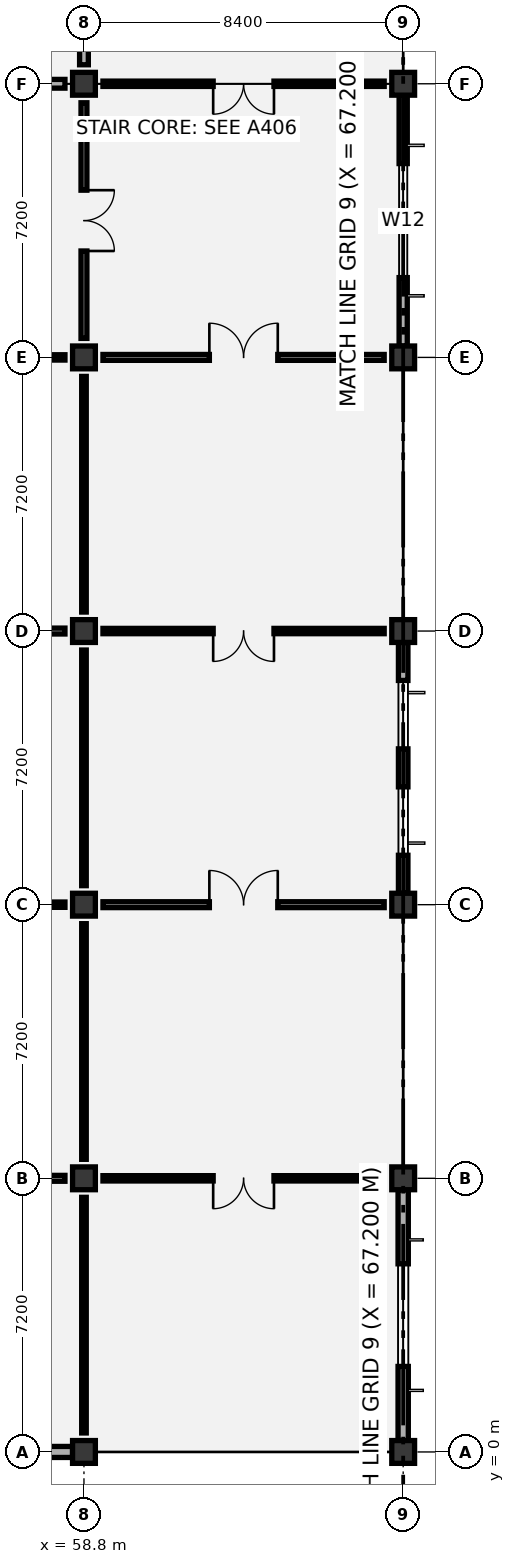
"""IFC4 building model, lengths in metres.
Left out: names, types, materials, properties, quantities, classifications, styles, units other than length and angle.
Written with IfcOpenShell. Run it as: python <this file> out.ifc"""

import sys

from ifc_helpers import new_model, si_unit, direction, frame, frame_2d, origin, origin_2d, place, context, subcontext, project, spatial, rectangle, extrude, element, fill, save


model = new_model("IFC4")
c1 = context("Model", 3, precision=1e-05, world=origin(), true_north=direction((0.0, 1.0)))
c2 = subcontext(c1, "Body", "Model", "MODEL_VIEW")
j1 = project(units=[si_unit("LENGTHUNIT", "METRE"), si_unit("PLANEANGLEUNIT", "RADIAN")], contexts=[c1])
p1 = place(None, origin())
s1 = spatial("IfcSite", under=j1, at=p1, CompositionType="ELEMENT")
p2 = place(p1, origin())
s2 = spatial("IfcBuilding", under=s1, at=p2, CompositionType="ELEMENT")
p3 = place(p2, frame((0.0, 0.0, 11.4)))
s3 = spatial("IfcBuildingStorey", under=s2, at=p3, CompositionType="ELEMENT", Elevation=11.4)
for number, where, z_axis, x_axis in (
    (1, (58.8, 0.0, 0.0), (0.0, 0.0, 1.0), (1.0, 0.0, 0.0)),
    (2, (58.8, 7.2, 0.0), (0.0, 0.0, 1.0), (1.0, 0.0, 0.0)),
    (3, (58.8, 14.4, 0.0), (0.0, 0.0, 1.0), (1.0, 0.0, 0.0)),
    (4, (58.8, 21.6, 0.0), (0.0, 0.0, 1.0), (1.0, 0.0, 0.0)),
    (5, (58.8, 28.8, 0.0), (0.0, 0.0, 1.0), (1.0, 0.0, 0.0)),
    (6, (58.8, 36.0, 0.0), (0.0, 0.0, 1.0), (1.0, 0.0, 0.0)),
    (7, (67.2, 0.0, 0.0), (0.0, 0.0, 1.0), (1.0, 0.0, 0.0)),
    (8, (67.2, 7.2, 0.0), (0.0, 0.0, 1.0), (1.0, 0.0, 0.0)),
    (9, (67.2, 14.4, 0.0), (0.0, 0.0, 1.0), (1.0, 0.0, 0.0)),
    (10, (67.2, 21.6, 0.0), (0.0, 0.0, 1.0), (1.0, 0.0, 0.0)),
    (11, (67.2, 28.8, 0.0), (0.0, 0.0, 1.0), (1.0, 0.0, 0.0)),
    (12, (67.2, 36.0, 0.0), (0.0, 0.0, 1.0), (1.0, 0.0, 0.0)),
):
    element("IfcColumn", number, at=place(p3, frame(where, z_axis=z_axis, x_axis=x_axis)), inside=s3, PredefinedType="COLUMN", context=c2, shape_type="SweptSolid", body=[
        extrude(rectangle(XDim=0.6, YDim=0.6, at=origin_2d()), origin(), (0.0, 0.0, 1.0), 5.4),
    ])
p4 = place(p3, frame((50.7, 0.0, 0.0), z_axis=(0.0, 0.0, 1.0), x_axis=(1.0, 0.0, 0.0)))
e13 = element("IfcWall", 13, at=p4, inside=s3, PredefinedType="SOLIDWALL", context=c2, shape_type="SweptSolid", body=[
    extrude(rectangle(XDim=7.8, YDim=0.29, at=frame_2d((3.9, 0.0))), origin(), (0.0, 0.0, 1.0), 4.52),
])
p5 = place(p4, frame((2.475, 0.0, 0.9)))
e14 = element("IfcOpeningElement", 14, at=p5, cuts=e13, PredefinedType="OPENING", context=c2, shape_type="SweptSolid", body=[
    extrude(rectangle(XDim=2.85, YDim=1.95, at=frame_2d((1.425, 0.975))), frame((0.0, 0.155, 0.0), z_axis=(0.0, -1.0, 0.0), x_axis=(1.0, 0.0, 0.0)), (0.0, 0.0, 1.0), 0.31),
])
p6 = place(p3, frame((67.2, 0.3, 0.0), z_axis=(0.0, 0.0, 1.0), x_axis=(0.0, 1.0, 0.0)))
e15 = element("IfcWall", 15, at=p6, inside=s3, PredefinedType="SOLIDWALL", context=c2, shape_type="SweptSolid", body=[
    extrude(rectangle(XDim=6.6, YDim=0.27, at=frame_2d((3.3, 0.0))), origin(), (0.0, 0.0, 1.0), 4.52),
])
p7 = place(p6, frame((1.95, 0.0, 0.9)))
e16 = element("IfcOpeningElement", 16, at=p7, cuts=e15, PredefinedType="OPENING", context=c2, shape_type="SweptSolid", body=[
    extrude(rectangle(XDim=2.7, YDim=2.1, at=frame_2d((1.35, 1.05))), frame((0.0, 0.145, 0.0), z_axis=(0.0, -1.0, 0.0), x_axis=(1.0, 0.0, 0.0)), (0.0, 0.0, 1.0), 0.29),
])
p8 = place(p3, frame((67.2, 14.7, 0.0), z_axis=(0.0, 0.0, 1.0), x_axis=(0.0, 1.0, 0.0)))
e17 = element("IfcWall", 17, at=p8, inside=s3, PredefinedType="SOLIDWALL", context=c2, shape_type="SweptSolid", body=[
    extrude(rectangle(XDim=6.6, YDim=0.25, at=frame_2d((3.3, 0.0))), origin(), (0.0, 0.0, 1.0), 4.445),
])
p9 = place(p8, frame((1.0, 0.0, 0.9)))
e18 = element("IfcOpeningElement", 18, at=p9, cuts=e17, PredefinedType="OPENING", context=c2, shape_type="SweptSolid", body=[
    extrude(rectangle(XDim=1.8, YDim=2.1, at=frame_2d((0.9, 1.05))), frame((0.0, 0.135, 0.0), z_axis=(0.0, -1.0, 0.0), x_axis=(1.0, 0.0, 0.0)), (0.0, 0.0, 1.0), 0.27),
])
p10 = place(p8, frame((3.8, 0.0, 0.9)))
e19 = element("IfcOpeningElement", 19, at=p10, cuts=e17, PredefinedType="OPENING", context=c2, shape_type="SweptSolid", body=[
    extrude(rectangle(XDim=1.8, YDim=2.1, at=frame_2d((0.9, 1.05))), frame((0.0, 0.135, 0.0), z_axis=(0.0, -1.0, 0.0), x_axis=(1.0, 0.0, 0.0)), (0.0, 0.0, 1.0), 0.27),
])
p11 = place(p3, frame((67.2, 29.1, 0.0), z_axis=(0.0, 0.0, 1.0), x_axis=(0.0, 1.0, 0.0)))
e20 = element("IfcWall", 20, at=p11, inside=s3, PredefinedType="SOLIDWALL", context=c2, shape_type="SweptSolid", body=[
    extrude(rectangle(XDim=6.6, YDim=0.215, at=frame_2d((3.3, 0.0))), origin(), (0.0, 0.0, 1.0), 4.445),
])
p12 = place(p11, frame((1.8, 0.0, 0.9)))
e21 = element("IfcOpeningElement", 21, at=p12, cuts=e20, PredefinedType="OPENING", context=c2, shape_type="SweptSolid", body=[
    extrude(rectangle(XDim=3.0, YDim=2.4, at=frame_2d((1.5, 1.2))), frame((0.0, 0.117, 0.0), z_axis=(0.0, -1.0, 0.0), x_axis=(1.0, 0.0, 0.0)), (0.0, 0.0, 1.0), 0.235),
])
p13 = place(p3, frame((58.8, 0.5, 0.0), z_axis=(0.0, 0.0, 1.0), x_axis=(0.0, 1.0, 0.0)))
e22 = element("IfcWall", 22, at=p13, inside=s3, PredefinedType="PARTITIONING", context=c2, shape_type="SweptSolid", body=[
    extrude(rectangle(XDim=6.2, YDim=0.12, at=frame_2d((3.1, 0.0))), origin(), (0.0, 0.0, 1.0), 4.47),
])
p14 = place(p3, frame((50.9, 7.2, 0.0), z_axis=(0.0, 0.0, 1.0), x_axis=(1.0, 0.0, 0.0)))
e23 = element("IfcWall", 23, at=p14, inside=s3, PredefinedType="PARTITIONING", context=c2, shape_type="SweptSolid", body=[
    extrude(rectangle(XDim=7.4, YDim=0.155, at=frame_2d((3.7, 0.0))), origin(), (0.0, 0.0, 1.0), 4.345),
])
p15 = place(p14, frame((2.9, 0.0, 0.0)))
e24 = element("IfcOpeningElement", 24, at=p15, cuts=e23, PredefinedType="OPENING", context=c2, shape_type="SweptSolid", body=[
    extrude(rectangle(XDim=1.6, YDim=2.2, at=frame_2d((0.8, 1.1))), frame((0.0, 0.087, 0.0), z_axis=(0.0, -1.0, 0.0), x_axis=(1.0, 0.0, 0.0)), (0.0, 0.0, 1.0), 0.175),
])
p16 = place(p3, frame((58.8, 7.7, 0.0), z_axis=(0.0, 0.0, 1.0), x_axis=(0.0, 1.0, 0.0)))
e25 = element("IfcWall", 25, at=p16, inside=s3, PredefinedType="PARTITIONING", context=c2, shape_type="SweptSolid", body=[
    extrude(rectangle(XDim=6.2, YDim=0.12, at=frame_2d((3.1, 0.0))), origin(), (0.0, 0.0, 1.0), 4.595),
])
p17 = place(p3, frame((50.9, 14.4, 0.0), z_axis=(0.0, 0.0, 1.0), x_axis=(1.0, 0.0, 0.0)))
e26 = element("IfcWall", 26, at=p17, inside=s3, PredefinedType="PARTITIONING", context=c2, shape_type="SweptSolid", body=[
    extrude(rectangle(XDim=7.4, YDim=0.14, at=frame_2d((3.7, 0.0))), origin(), (0.0, 0.0, 1.0), 4.345),
])
p18 = place(p17, frame((2.8, 0.0, 0.0)))
e27 = element("IfcOpeningElement", 27, at=p18, cuts=e26, PredefinedType="OPENING", context=c2, shape_type="SweptSolid", body=[
    extrude(rectangle(XDim=1.8, YDim=2.25, at=frame_2d((0.9, 1.125))), frame((0.0, 0.08, 0.0), z_axis=(0.0, -1.0, 0.0), x_axis=(1.0, 0.0, 0.0)), (0.0, 0.0, 1.0), 0.16),
])
p19 = place(p3, frame((58.8, 14.9, 0.0), z_axis=(0.0, 0.0, 1.0), x_axis=(0.0, 1.0, 0.0)))
e28 = element("IfcWall", 28, at=p19, inside=s3, PredefinedType="PARTITIONING", context=c2, shape_type="SweptSolid", body=[
    extrude(rectangle(XDim=6.2, YDim=0.12, at=frame_2d((3.1, 0.0))), origin(), (0.0, 0.0, 1.0), 4.395),
])
p20 = place(p3, frame((50.9, 21.6, 0.0), z_axis=(0.0, 0.0, 1.0), x_axis=(1.0, 0.0, 0.0)))
e29 = element("IfcWall", 29, at=p20, inside=s3, PredefinedType="PARTITIONING", context=c2, shape_type="SweptSolid", body=[
    extrude(rectangle(XDim=7.4, YDim=0.155, at=frame_2d((3.7, 0.0))), origin(), (0.0, 0.0, 1.0), 4.345),
])
p21 = place(p20, frame((2.9, 0.0, 0.0)))
e30 = element("IfcOpeningElement", 30, at=p21, cuts=e29, PredefinedType="OPENING", context=c2, shape_type="SweptSolid", body=[
    extrude(rectangle(XDim=1.6, YDim=2.2, at=frame_2d((0.8, 1.1))), frame((0.0, 0.087, 0.0), z_axis=(0.0, -1.0, 0.0), x_axis=(1.0, 0.0, 0.0)), (0.0, 0.0, 1.0), 0.175),
])
p22 = place(p3, frame((58.8, 22.1, 0.0), z_axis=(0.0, 0.0, 1.0), x_axis=(0.0, 1.0, 0.0)))
e31 = element("IfcWall", 31, at=p22, inside=s3, PredefinedType="PARTITIONING", context=c2, shape_type="SweptSolid", body=[
    extrude(rectangle(XDim=6.2, YDim=0.12, at=frame_2d((3.1, 0.0))), origin(), (0.0, 0.0, 1.0), 4.695),
])
p23 = place(p3, frame((50.9, 28.8, 0.0), z_axis=(0.0, 0.0, 1.0), x_axis=(1.0, 0.0, 0.0)))
e32 = element("IfcWall", 32, at=p23, inside=s3, PredefinedType="PARTITIONING", context=c2, shape_type="SweptSolid", body=[
    extrude(rectangle(XDim=7.4, YDim=0.14, at=frame_2d((3.7, 0.0))), origin(), (0.0, 0.0, 1.0), 4.345),
])
p24 = place(p23, frame((2.8, 0.0, 0.0)))
e33 = element("IfcOpeningElement", 33, at=p24, cuts=e32, PredefinedType="OPENING", context=c2, shape_type="SweptSolid", body=[
    extrude(rectangle(XDim=1.8, YDim=2.25, at=frame_2d((0.9, 1.125))), frame((0.0, 0.08, 0.0), z_axis=(0.0, -1.0, 0.0), x_axis=(1.0, 0.0, 0.0)), (0.0, 0.0, 1.0), 0.16),
])
p25 = place(p3, frame((58.8, 29.3, 0.0), z_axis=(0.0, 0.0, 1.0), x_axis=(0.0, 1.0, 0.0)))
e34 = element("IfcWall", 34, at=p25, inside=s3, PredefinedType="PARTITIONING", context=c2, shape_type="SweptSolid", body=[
    extrude(rectangle(XDim=6.2, YDim=0.155, at=frame_2d((3.1, 0.0))), origin(), (0.0, 0.0, 1.0), 4.395),
])
p26 = place(p25, frame((2.3, 0.0, 0.0)))
e35 = element("IfcOpeningElement", 35, at=p26, cuts=e34, PredefinedType="OPENING", context=c2, shape_type="SweptSolid", body=[
    extrude(rectangle(XDim=1.6, YDim=2.2, at=frame_2d((0.8, 1.1))), frame((0.0, 0.087, 0.0), z_axis=(0.0, -1.0, 0.0), x_axis=(1.0, 0.0, 0.0)), (0.0, 0.0, 1.0), 0.175),
])
p27 = place(p3, frame((50.9, 36.0, 0.0), z_axis=(0.0, 0.0, 1.0), x_axis=(1.0, 0.0, 0.0)))
e36 = element("IfcWall", 36, at=p27, inside=s3, PredefinedType="PARTITIONING", context=c2, shape_type="SweptSolid", body=[
    extrude(rectangle(XDim=7.4, YDim=0.23, at=frame_2d((3.7, 0.0))), origin(), (0.0, 0.0, 1.0), 4.345),
])
p28 = place(p27, frame((2.95, 0.0, 0.0)))
e37 = element("IfcOpeningElement", 37, at=p28, cuts=e36, PredefinedType="OPENING", context=c2, shape_type="SweptSolid", body=[
    extrude(rectangle(XDim=1.5, YDim=2.15, at=frame_2d((0.75, 1.075))), frame((0.0, 0.125, 0.0), z_axis=(0.0, -1.0, 0.0), x_axis=(1.0, 0.0, 0.0)), (0.0, 0.0, 1.0), 0.25),
])
p29 = place(p3, frame((58.8, 36.5, 0.0), z_axis=(0.0, 0.0, 1.0), x_axis=(0.0, 1.0, 0.0)))
e38 = element("IfcWall", 38, at=p29, inside=s3, PredefinedType="PARTITIONING", context=c2, shape_type="SweptSolid", body=[
    extrude(rectangle(XDim=6.2, YDim=0.23, at=frame_2d((3.1, 0.0))), origin(), (0.0, 0.0, 1.0), 4.805),
])
p30 = place(p3, frame((59.3, 7.2, 0.0), z_axis=(0.0, 0.0, 1.0), x_axis=(1.0, 0.0, 0.0)))
e39 = element("IfcWall", 39, at=p30, inside=s3, PredefinedType="PARTITIONING", context=c2, shape_type="SweptSolid", body=[
    extrude(rectangle(XDim=7.4, YDim=0.14, at=frame_2d((3.7, 0.0))), origin(), (0.0, 0.0, 1.0), 4.345),
])
p31 = place(p30, frame((2.9, 0.0, 0.0)))
e40 = element("IfcOpeningElement", 40, at=p31, cuts=e39, PredefinedType="OPENING", context=c2, shape_type="SweptSolid", body=[
    extrude(rectangle(XDim=1.6, YDim=2.2, at=frame_2d((0.8, 1.1))), frame((0.0, 0.08, 0.0), z_axis=(0.0, -1.0, 0.0), x_axis=(1.0, 0.0, 0.0)), (0.0, 0.0, 1.0), 0.16),
])
p32 = place(p3, frame((59.3, 14.4, 0.0), z_axis=(0.0, 0.0, 1.0), x_axis=(1.0, 0.0, 0.0)))
e41 = element("IfcWall", 41, at=p32, inside=s3, PredefinedType="PARTITIONING", context=c2, shape_type="SweptSolid", body=[
    extrude(rectangle(XDim=7.4, YDim=0.155, at=frame_2d((3.7, 0.0))), origin(), (0.0, 0.0, 1.0), 4.345),
])
p33 = place(p32, frame((2.8, 0.0, 0.0)))
e42 = element("IfcOpeningElement", 42, at=p33, cuts=e41, PredefinedType="OPENING", context=c2, shape_type="SweptSolid", body=[
    extrude(rectangle(XDim=1.8, YDim=2.25, at=frame_2d((0.9, 1.125))), frame((0.0, 0.087, 0.0), z_axis=(0.0, -1.0, 0.0), x_axis=(1.0, 0.0, 0.0)), (0.0, 0.0, 1.0), 0.175),
])
p34 = place(p3, frame((59.3, 21.6, 0.0), z_axis=(0.0, 0.0, 1.0), x_axis=(1.0, 0.0, 0.0)))
e43 = element("IfcWall", 43, at=p34, inside=s3, PredefinedType="PARTITIONING", context=c2, shape_type="SweptSolid", body=[
    extrude(rectangle(XDim=7.4, YDim=0.14, at=frame_2d((3.7, 0.0))), origin(), (0.0, 0.0, 1.0), 4.345),
])
p35 = place(p34, frame((2.9, 0.0, 0.0)))
e44 = element("IfcOpeningElement", 44, at=p35, cuts=e43, PredefinedType="OPENING", context=c2, shape_type="SweptSolid", body=[
    extrude(rectangle(XDim=1.6, YDim=2.2, at=frame_2d((0.8, 1.1))), frame((0.0, 0.08, 0.0), z_axis=(0.0, -1.0, 0.0), x_axis=(1.0, 0.0, 0.0)), (0.0, 0.0, 1.0), 0.16),
])
p36 = place(p3, frame((59.3, 28.8, 0.0), z_axis=(0.0, 0.0, 1.0), x_axis=(1.0, 0.0, 0.0)))
e45 = element("IfcWall", 45, at=p36, inside=s3, PredefinedType="PARTITIONING", context=c2, shape_type="SweptSolid", body=[
    extrude(rectangle(XDim=7.4, YDim=0.155, at=frame_2d((3.7, 0.0))), origin(), (0.0, 0.0, 1.0), 4.345),
])
p37 = place(p36, frame((2.8, 0.0, 0.0)))
e46 = element("IfcOpeningElement", 46, at=p37, cuts=e45, PredefinedType="OPENING", context=c2, shape_type="SweptSolid", body=[
    extrude(rectangle(XDim=1.8, YDim=2.25, at=frame_2d((0.9, 1.125))), frame((0.0, 0.087, 0.0), z_axis=(0.0, -1.0, 0.0), x_axis=(1.0, 0.0, 0.0)), (0.0, 0.0, 1.0), 0.175),
])
p38 = place(p3, frame((59.3, 36.0, 0.0), z_axis=(0.0, 0.0, 1.0), x_axis=(1.0, 0.0, 0.0)))
e47 = element("IfcWall", 47, at=p38, inside=s3, PredefinedType="PARTITIONING", context=c2, shape_type="SweptSolid", body=[
    extrude(rectangle(XDim=7.4, YDim=0.14, at=frame_2d((3.7, 0.0))), origin(), (0.0, 0.0, 1.0), 4.345),
])
p39 = place(p38, frame((2.9, 0.0, 0.0)))
e48 = element("IfcOpeningElement", 48, at=p39, cuts=e47, PredefinedType="OPENING", context=c2, shape_type="SweptSolid", body=[
    extrude(rectangle(XDim=1.6, YDim=2.2, at=frame_2d((0.8, 1.1))), frame((0.0, 0.08, 0.0), z_axis=(0.0, -1.0, 0.0), x_axis=(1.0, 0.0, 0.0)), (0.0, 0.0, 1.0), 0.16),
])
p40 = place(p7, origin())
e49 = element("IfcWindow", 49, at=p40, inside=s3, PartitioningType="SINGLE_PANEL", PredefinedType="WINDOW", context=c2, shape_type="SweptSolid", body=[
    extrude(rectangle(XDim=2.7, YDim=2.1, at=frame_2d((1.35, 1.05))), frame((0.0, 0.03, 0.0), z_axis=(0.0, -1.0, 0.0), x_axis=(1.0, 0.0, 0.0)), (0.0, 0.0, 1.0), 0.06),
])
fill(e16, e49)
p41 = place(p9, origin())
e50 = element("IfcWindow", 50, at=p41, inside=s3, PartitioningType="SINGLE_PANEL", PredefinedType="WINDOW", context=c2, shape_type="SweptSolid", body=[
    extrude(rectangle(XDim=1.8, YDim=2.1, at=frame_2d((0.9, 1.05))), frame((0.0, 0.03, 0.0), z_axis=(0.0, -1.0, 0.0), x_axis=(1.0, 0.0, 0.0)), (0.0, 0.0, 1.0), 0.06),
])
fill(e18, e50)
p42 = place(p10, origin())
e51 = element("IfcWindow", 51, at=p42, inside=s3, PartitioningType="SINGLE_PANEL", PredefinedType="WINDOW", context=c2, shape_type="SweptSolid", body=[
    extrude(rectangle(XDim=1.8, YDim=2.1, at=frame_2d((0.9, 1.05))), frame((0.0, 0.03, 0.0), z_axis=(0.0, -1.0, 0.0), x_axis=(1.0, 0.0, 0.0)), (0.0, 0.0, 1.0), 0.06),
])
fill(e19, e51)
p43 = place(p12, origin())
e52 = element("IfcWindow", 52, at=p43, inside=s3, PartitioningType="SINGLE_PANEL", PredefinedType="WINDOW", context=c2, shape_type="SweptSolid", body=[
    extrude(rectangle(XDim=3.0, YDim=2.4, at=frame_2d((1.5, 1.2))), frame((0.0, 0.03, 0.0), z_axis=(0.0, -1.0, 0.0), x_axis=(1.0, 0.0, 0.0)), (0.0, 0.0, 1.0), 0.06),
])
fill(e21, e52)
p44 = place(p26, frame((1.6, 0.0, 0.0), z_axis=(0.0, 0.0, 1.0), x_axis=(-1.0, 0.0, 0.0)))
e53 = element("IfcDoor", 53, at=p44, inside=s3, OperationType="DOUBLE_DOOR_SINGLE_SWING", PredefinedType="DOOR", context=c2, shape_type="SweptSolid", body=[
    extrude(rectangle(XDim=1.6, YDim=2.2, at=frame_2d((0.8, 1.1))), frame((0.0, 0.025, 0.0), z_axis=(0.0, -1.0, 0.0), x_axis=(1.0, 0.0, 0.0)), (0.0, 0.0, 1.0), 0.05),
])
fill(e35, e53)
p45 = place(p31, frame((1.6, 0.0, 0.0), z_axis=(0.0, 0.0, 1.0), x_axis=(-1.0, 0.0, 0.0)))
e54 = element("IfcDoor", 54, at=p45, inside=s3, OperationType="DOUBLE_DOOR_SINGLE_SWING", PredefinedType="DOOR", context=c2, shape_type="SweptSolid", body=[
    extrude(rectangle(XDim=1.6, YDim=2.2, at=frame_2d((0.8, 1.1))), frame((0.0, 0.025, 0.0), z_axis=(0.0, -1.0, 0.0), x_axis=(1.0, 0.0, 0.0)), (0.0, 0.0, 1.0), 0.05),
])
fill(e40, e54)
p46 = place(p33, origin())
e55 = element("IfcDoor", 55, at=p46, inside=s3, OperationType="DOUBLE_DOOR_SINGLE_SWING", PredefinedType="DOOR", context=c2, shape_type="SweptSolid", body=[
    extrude(rectangle(XDim=1.8, YDim=2.25, at=frame_2d((0.9, 1.125))), frame((0.0, 0.025, 0.0), z_axis=(0.0, -1.0, 0.0), x_axis=(1.0, 0.0, 0.0)), (0.0, 0.0, 1.0), 0.05),
])
fill(e42, e55)
p47 = place(p35, frame((1.6, 0.0, 0.0), z_axis=(0.0, 0.0, 1.0), x_axis=(-1.0, 0.0, 0.0)))
e56 = element("IfcDoor", 56, at=p47, inside=s3, OperationType="DOUBLE_DOOR_SINGLE_SWING", PredefinedType="DOOR", context=c2, shape_type="SweptSolid", body=[
    extrude(rectangle(XDim=1.6, YDim=2.2, at=frame_2d((0.8, 1.1))), frame((0.0, 0.025, 0.0), z_axis=(0.0, -1.0, 0.0), x_axis=(1.0, 0.0, 0.0)), (0.0, 0.0, 1.0), 0.05),
])
fill(e44, e56)
p48 = place(p37, origin())
e57 = element("IfcDoor", 57, at=p48, inside=s3, OperationType="DOUBLE_DOOR_SINGLE_SWING", PredefinedType="DOOR", context=c2, shape_type="SweptSolid", body=[
    extrude(rectangle(XDim=1.8, YDim=2.25, at=frame_2d((0.9, 1.125))), frame((0.0, 0.025, 0.0), z_axis=(0.0, -1.0, 0.0), x_axis=(1.0, 0.0, 0.0)), (0.0, 0.0, 1.0), 0.05),
])
fill(e46, e57)
p49 = place(p39, frame((1.6, 0.0, 0.0), z_axis=(0.0, 0.0, 1.0), x_axis=(-1.0, 0.0, 0.0)))
e58 = element("IfcDoor", 58, at=p49, inside=s3, OperationType="DOUBLE_DOOR_SINGLE_SWING", PredefinedType="DOOR", context=c2, shape_type="SweptSolid", body=[
    extrude(rectangle(XDim=1.6, YDim=2.2, at=frame_2d((0.8, 1.1))), frame((0.0, 0.025, 0.0), z_axis=(0.0, -1.0, 0.0), x_axis=(1.0, 0.0, 0.0)), (0.0, 0.0, 1.0), 0.05),
])
fill(e48, e58)
save(model, sys.argv[1])
